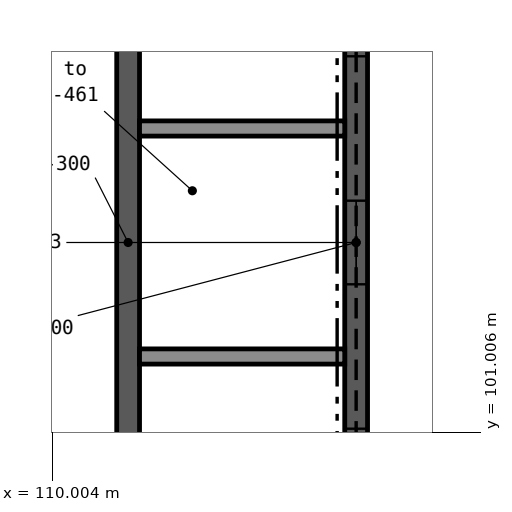
"""IFC4 building model, lengths in metres.
Left out: names, types, materials, properties, quantities, classifications, styles, units other than length and angle.
Written with IfcOpenShell. Run it as: python <this file> out.ifc"""

import sys

from ifc_helpers import new_model, si_unit, direction, frame, frame_2d, origin, place, context, subcontext, project, spatial, rectangle, extrude, element, fill, save


model = new_model("IFC4")
c1 = context("Model", 3, precision=1e-05, world=origin(), true_north=direction((0.0, 1.0)))
c2 = subcontext(c1, "Body", "Model", "MODEL_VIEW")
j1 = project(units=[si_unit("LENGTHUNIT", "METRE"), si_unit("PLANEANGLEUNIT", "RADIAN")], contexts=[c1])
p1 = place(None, origin())
s1 = spatial("IfcSite", under=j1, at=p1, CompositionType="ELEMENT")
p2 = place(p1, origin())
s2 = spatial("IfcBuilding", under=s1, at=p2, CompositionType="ELEMENT")
p3 = place(p2, frame((0.0, 0.0, 21.6)))
s3 = spatial("IfcBuildingStorey", under=s2, at=p3, CompositionType="ELEMENT", Elevation=21.6)
p4 = place(p3, frame((111.0, 99.15, 0.0), z_axis=(0.0, 0.0, 1.0), x_axis=(0.0, 1.0, 0.0)))
e1 = element("IfcWall", 1, at=p4, inside=s3, PredefinedType="SHEAR", context=c2, shape_type="SweptSolid", body=[
    extrude(rectangle(XDim=8.7, YDim=0.3, at=frame_2d((4.35, 0.0))), origin(), (0.0, 0.0, 1.0), 5.4),
])
p5 = place(p3, frame((114.0, 99.15, 0.0), z_axis=(0.0, 0.0, 1.0), x_axis=(0.0, 1.0, 0.0)))
e2 = element("IfcWall", 2, at=p5, inside=s3, PredefinedType="SHEAR", context=c2, shape_type="SweptSolid", body=[
    extrude(rectangle(XDim=8.7, YDim=0.3, at=frame_2d((4.35, 0.0))), origin(), (0.0, 0.0, 1.0), 5.4),
])
p6 = place(p5, frame((0.8, 0.0, 0.0)))
e3 = element("IfcOpeningElement", 3, at=p6, cuts=e2, PredefinedType="OPENING", context=c2, shape_type="SweptSolid", body=[
    extrude(rectangle(XDim=1.1, YDim=2.1, at=frame_2d((0.55, 1.05))), frame((0.0, 0.161, 0.0), z_axis=(0.0, -1.0, 0.0), x_axis=(1.0, 0.0, 0.0)), (0.0, 0.0, 1.0), 0.322),
])
p7 = place(p5, frame((3.8, 0.0, 0.0)))
e4 = element("IfcOpeningElement", 4, at=p7, cuts=e2, PredefinedType="OPENING", context=c2, shape_type="SweptSolid", body=[
    extrude(rectangle(XDim=1.1, YDim=2.1, at=frame_2d((0.55, 1.05))), frame((0.0, 0.161, 0.0), z_axis=(0.0, -1.0, 0.0), x_axis=(1.0, 0.0, 0.0)), (0.0, 0.0, 1.0), 0.322),
])
p8 = place(p5, frame((6.8, 0.0, 0.0)))
e5 = element("IfcOpeningElement", 5, at=p8, cuts=e2, PredefinedType="OPENING", context=c2, shape_type="SweptSolid", body=[
    extrude(rectangle(XDim=1.1, YDim=2.1, at=frame_2d((0.55, 1.05))), frame((0.0, 0.161, 0.0), z_axis=(0.0, -1.0, 0.0), x_axis=(1.0, 0.0, 0.0)), (0.0, 0.0, 1.0), 0.322),
])
for number, where, z_axis, x_axis in (
    (6, (111.15, 102.0, 0.0), (0.0, 0.0, 1.0), (1.0, 0.0, 0.0)),
    (7, (111.15, 105.0, 0.0), (0.0, 0.0, 1.0), (1.0, 0.0, 0.0)),
):
    element("IfcWall", number, at=place(p3, frame(where, z_axis=z_axis, x_axis=x_axis)), inside=s3, PredefinedType="SOLIDWALL", context=c2, shape_type="SweptSolid", body=[
        extrude(rectangle(XDim=2.7, YDim=0.2, at=frame_2d((1.35, 0.0))), origin(), (0.0, 0.0, 1.0), 5.4),
    ])
p9 = place(p6, origin())
e8 = element("IfcDoor", 8, at=p9, inside=s3, OperationType="DOUBLE_DOOR_SLIDING", PredefinedType="DOOR", context=c2, shape_type="SweptSolid", body=[
    extrude(rectangle(XDim=1.1, YDim=2.1, at=frame_2d((0.55, 1.05))), frame((0.0, 0.025, 0.0), z_axis=(0.0, -1.0, 0.0), x_axis=(1.0, 0.0, 0.0)), (0.0, 0.0, 1.0), 0.05),
])
fill(e3, e8)
p10 = place(p7, origin())
e9 = element("IfcDoor", 9, at=p10, inside=s3, OperationType="DOUBLE_DOOR_SLIDING", PredefinedType="DOOR", context=c2, shape_type="SweptSolid", body=[
    extrude(rectangle(XDim=1.1, YDim=2.1, at=frame_2d((0.55, 1.05))), frame((0.0, 0.025, 0.0), z_axis=(0.0, -1.0, 0.0), x_axis=(1.0, 0.0, 0.0)), (0.0, 0.0, 1.0), 0.05),
])
fill(e4, e9)
p11 = place(p8, origin())
e10 = element("IfcDoor", 10, at=p11, inside=s3, OperationType="DOUBLE_DOOR_SLIDING", PredefinedType="DOOR", context=c2, shape_type="SweptSolid", body=[
    extrude(rectangle(XDim=1.1, YDim=2.1, at=frame_2d((0.55, 1.05))), frame((0.0, 0.025, 0.0), z_axis=(0.0, -1.0, 0.0), x_axis=(1.0, 0.0, 0.0)), (0.0, 0.0, 1.0), 0.05),
])
fill(e5, e10)
save(model, sys.argv[1])
